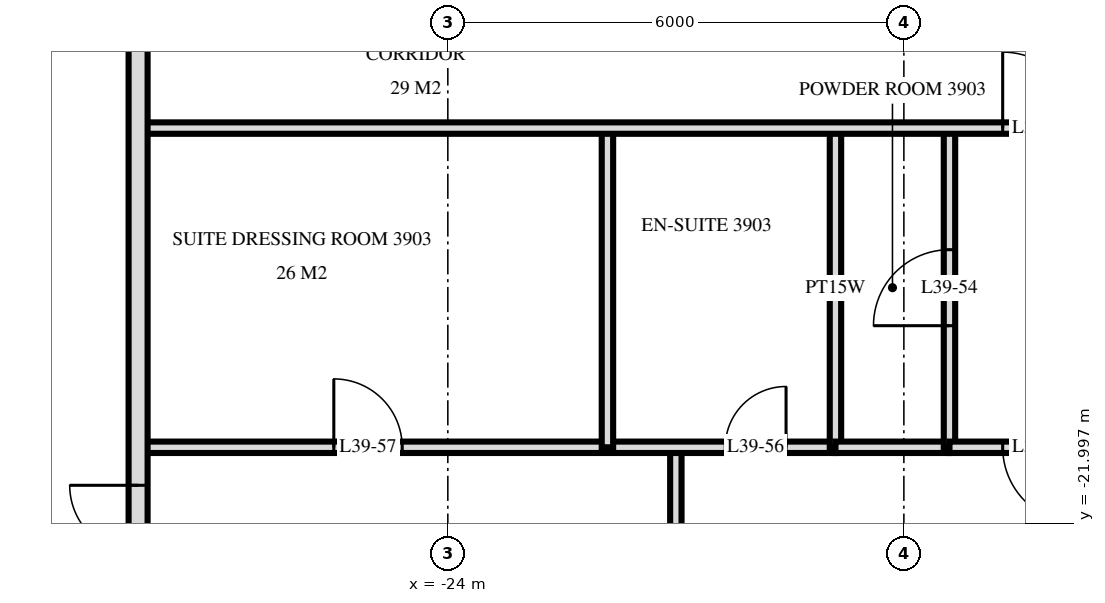
"""IFC4 building model, lengths in metres.
Left out: names, types, materials, properties, quantities, classifications, styles, units other than length and angle.
Written with IfcOpenShell. Run it as: python <this file> out.ifc"""

import sys

from ifc_helpers import new_model, si_unit, direction, frame, frame_2d, origin, place, context, subcontext, project, spatial, rectangle, extrude, element, fill, save


model = new_model("IFC4")
c1 = context("Model", 3, precision=1e-05, world=origin(), true_north=direction((0.0, 1.0)))
c2 = subcontext(c1, "Body", "Model", "MODEL_VIEW")
j1 = project(units=[si_unit("LENGTHUNIT", "METRE"), si_unit("PLANEANGLEUNIT", "RADIAN")], contexts=[c1])
p1 = place(None, origin())
s1 = spatial("IfcSite", under=j1, at=p1, CompositionType="ELEMENT")
p2 = place(p1, origin())
s2 = spatial("IfcBuilding", under=s1, at=p2, CompositionType="ELEMENT")
p3 = place(p2, frame((0.0, 0.0, 152.4)))
s3 = spatial("IfcBuildingStorey", under=s2, at=p3, CompositionType="ELEMENT", Elevation=152.4)
p4 = place(p3, frame((-28.075, -3.325, 0.0), z_axis=(0.0, 0.0, 1.0), x_axis=(0.0, -1.0, 0.0)))
e1 = element("IfcWall", 1, at=p4, inside=s3, PredefinedType="SOLIDWALL", context=c2, shape_type="SweptSolid", body=[
    extrude(rectangle(XDim=25.951, YDim=0.25, at=frame_2d((12.975, 0.0))), origin(), (0.0, 0.0, 1.0), 3.32),
])
p5 = place(p4, frame((7.275, 0.0, 0.0)))
e2 = element("IfcOpeningElement", 2, at=p5, cuts=e1, PredefinedType="OPENING", context=c2, shape_type="SweptSolid", body=[
    extrude(rectangle(XDim=1.8, YDim=2.4, at=frame_2d((0.9, 1.2))), frame((0.0, 0.135, 0.0), z_axis=(0.0, -1.0, 0.0), x_axis=(1.0, 0.0, 0.0)), (0.0, 0.0, 1.0), 0.27),
])
p6 = place(p4, frame((18.175, 0.0, 0.0)))
e3 = element("IfcOpeningElement", 3, at=p6, cuts=e1, PredefinedType="OPENING", context=c2, shape_type="SweptSolid", body=[
    extrude(rectangle(XDim=1.8, YDim=2.4, at=frame_2d((0.9, 1.2))), frame((0.0, 0.135, 0.0), z_axis=(0.0, -1.0, 0.0), x_axis=(1.0, 0.0, 0.0)), (0.0, 0.0, 1.0), 0.27),
])
p7 = place(p4, frame((21.075, 0.0, 0.0)))
e4 = element("IfcOpeningElement", 4, at=p7, cuts=e1, PredefinedType="OPENING", context=c2, shape_type="SweptSolid", body=[
    extrude(rectangle(XDim=1.8, YDim=2.4, at=frame_2d((0.9, 1.2))), frame((0.0, 0.135, 0.0), z_axis=(0.0, -1.0, 0.0), x_axis=(1.0, 0.0, 0.0)), (0.0, 0.0, 1.0), 0.27),
])
p8 = place(p4, frame((23.825, 0.0, 0.3)))
e5 = element("IfcOpeningElement", 5, at=p8, cuts=e1, PredefinedType="OPENING", context=c2, shape_type="SweptSolid", body=[
    extrude(rectangle(XDim=1.8, YDim=2.1, at=frame_2d((0.9, 1.05))), frame((0.0, 0.135, 0.0), z_axis=(0.0, -1.0, 0.0), x_axis=(1.0, 0.0, 0.0)), (0.0, 0.0, 1.0), 0.27),
])
p9 = place(p3, frame((-17.4, -21.0, 0.0), z_axis=(0.0, 0.0, 1.0), x_axis=(0.0, 1.0, 0.0)))
e6 = element("IfcWall", 6, at=p9, inside=s3, PredefinedType="PARTITIONING", context=c2, shape_type="SweptSolid", body=[
    extrude(rectangle(XDim=4.2, YDim=0.15, at=frame_2d((2.1, 0.0))), origin(), (0.0, 0.0, 1.0), 3.32),
])
p10 = place(p9, frame((1.6, 0.0, 0.0)))
e7 = element("IfcOpeningElement", 7, at=p10, cuts=e6, PredefinedType="OPENING", context=c2, shape_type="SweptSolid", body=[
    extrude(rectangle(XDim=1.0, YDim=2.1, at=frame_2d((0.5, 1.05))), frame((0.0, 0.085, 0.0), z_axis=(0.0, -1.0, 0.0), x_axis=(1.0, 0.0, 0.0)), (0.0, 0.0, 1.0), 0.17),
])
p11 = place(p3, frame((-18.9, -21.0, 0.0), z_axis=(0.0, 0.0, 1.0), x_axis=(0.0, 1.0, 0.0)))
e8 = element("IfcWall", 8, at=p11, inside=s3, PredefinedType="PLUMBINGWALL", context=c2, shape_type="SweptSolid", body=[
    extrude(rectangle(XDim=4.2, YDim=0.15, at=frame_2d((2.1, 0.0))), origin(), (0.0, 0.0, 1.0), 3.32),
])
p12 = place(p3, frame((-21.0, -33.62, 0.0), z_axis=(0.0, 0.0, 1.0), x_axis=(0.0, 1.0, 0.0)))
e9 = element("IfcWall", 9, at=p12, inside=s3, PredefinedType="PARTITIONING", context=c2, shape_type="SweptSolid", body=[
    extrude(rectangle(XDim=12.62, YDim=0.15, at=frame_2d((6.31, 0.0))), origin(), (0.0, 0.0, 1.0), 3.32),
])
p13 = place(p12, frame((5.77, 0.0, 0.0)))
e10 = element("IfcOpeningElement", 10, at=p13, cuts=e9, PredefinedType="OPENING", context=c2, shape_type="SweptSolid", body=[
    extrude(rectangle(XDim=0.9, YDim=2.1, at=frame_2d((0.45, 1.05))), frame((0.0, 0.085, 0.0), z_axis=(0.0, -1.0, 0.0), x_axis=(1.0, 0.0, 0.0)), (0.0, 0.0, 1.0), 0.17),
])
p14 = place(p3, frame((-21.9, -21.0, 0.0), z_axis=(0.0, 0.0, 1.0), x_axis=(0.0, 1.0, 0.0)))
e11 = element("IfcWall", 11, at=p14, inside=s3, PredefinedType="PARTITIONING", context=c2, shape_type="SweptSolid", body=[
    extrude(rectangle(XDim=4.2, YDim=0.15, at=frame_2d((2.1, 0.0))), origin(), (0.0, 0.0, 1.0), 3.32),
])
p15 = place(p3, frame((-17.4, -21.0, 0.0), z_axis=(0.0, 0.0, 1.0), x_axis=(1.0, 0.0, 0.0)))
e12 = element("IfcWall", 12, at=p15, inside=s3, PredefinedType="PARTITIONING", context=c2, shape_type="SweptSolid", body=[
    extrude(rectangle(XDim=2.4, YDim=0.15, at=frame_2d((1.2, 0.0))), origin(), (0.0, 0.0, 1.0), 3.32),
])
p16 = place(p15, frame((0.7, 0.0, 0.0)))
e13 = element("IfcOpeningElement", 13, at=p16, cuts=e12, PredefinedType="OPENING", context=c2, shape_type="SweptSolid", body=[
    extrude(rectangle(XDim=1.0, YDim=2.1, at=frame_2d((0.5, 1.05))), frame((0.0, 0.085, 0.0), z_axis=(0.0, -1.0, 0.0), x_axis=(1.0, 0.0, 0.0)), (0.0, 0.0, 1.0), 0.17),
])
p17 = place(p3, frame((-28.02, -21.0, 0.0), z_axis=(0.0, 0.0, 1.0), x_axis=(1.0, 0.0, 0.0)))
e14 = element("IfcWall", 14, at=p17, inside=s3, PredefinedType="PARTITIONING", context=c2, shape_type="SweptSolid", body=[
    extrude(rectangle(XDim=9.12, YDim=0.15, at=frame_2d((4.56, 0.0))), origin(), (0.0, 0.0, 1.0), 3.32),
])
p18 = place(p17, frame((7.67, 0.0, 0.0)))
e15 = element("IfcOpeningElement", 15, at=p18, cuts=e14, PredefinedType="OPENING", context=c2, shape_type="SweptSolid", body=[
    extrude(rectangle(XDim=0.8, YDim=2.1, at=frame_2d((0.4, 1.05))), frame((0.0, 0.085, 0.0), z_axis=(0.0, -1.0, 0.0), x_axis=(1.0, 0.0, 0.0)), (0.0, 0.0, 1.0), 0.17),
])
p19 = place(p17, frame((2.52, 0.0, 0.0)))
e16 = element("IfcOpeningElement", 16, at=p19, cuts=e14, PredefinedType="OPENING", context=c2, shape_type="SweptSolid", body=[
    extrude(rectangle(XDim=0.9, YDim=2.1, at=frame_2d((0.45, 1.05))), frame((0.0, 0.085, 0.0), z_axis=(0.0, -1.0, 0.0), x_axis=(1.0, 0.0, 0.0)), (0.0, 0.0, 1.0), 0.17),
])
p20 = place(p3, frame((-18.9, -21.0, 0.0), z_axis=(0.0, 0.0, 1.0), x_axis=(1.0, 0.0, 0.0)))
e17 = element("IfcWall", 17, at=p20, inside=s3, PredefinedType="PLUMBINGWALL", context=c2, shape_type="SweptSolid", body=[
    extrude(rectangle(XDim=1.5, YDim=0.15, at=frame_2d((0.75, 0.0))), origin(), (0.0, 0.0, 1.0), 3.32),
])
p21 = place(p3, frame((-28.02, -16.8, 0.0), z_axis=(0.0, 0.0, 1.0), x_axis=(1.0, 0.0, 0.0)))
e18 = element("IfcWall", 18, at=p21, inside=s3, PredefinedType="PARTITIONING", context=c2, shape_type="SweptSolid", body=[
    extrude(rectangle(XDim=56.04, YDim=0.15, at=frame_2d((28.02, 0.0))), origin(), (0.0, 0.0, 1.0), 3.32),
])
p22 = place(p21, frame((13.17, 0.0, 0.0)))
e19 = element("IfcOpeningElement", 19, at=p22, cuts=e18, PredefinedType="OPENING", context=c2, shape_type="SweptSolid", body=[
    extrude(rectangle(XDim=1.0, YDim=2.1, at=frame_2d((0.5, 1.05))), frame((0.0, 0.085, 0.0), z_axis=(0.0, -1.0, 0.0), x_axis=(1.0, 0.0, 0.0)), (0.0, 0.0, 1.0), 0.17),
])
p23 = place(p21, frame((11.32, 0.0, 0.0)))
e20 = element("IfcOpeningElement", 20, at=p23, cuts=e18, PredefinedType="OPENING", context=c2, shape_type="SweptSolid", body=[
    extrude(rectangle(XDim=1.0, YDim=2.1, at=frame_2d((0.5, 1.05))), frame((0.0, 0.085, 0.0), z_axis=(0.0, -1.0, 0.0), x_axis=(1.0, 0.0, 0.0)), (0.0, 0.0, 1.0), 0.17),
])
p24 = place(p21, frame((41.87, 0.0, 0.0)))
e21 = element("IfcOpeningElement", 21, at=p24, cuts=e18, PredefinedType="OPENING", context=c2, shape_type="SweptSolid", body=[
    extrude(rectangle(XDim=1.0, YDim=2.1, at=frame_2d((0.5, 1.05))), frame((0.0, 0.085, 0.0), z_axis=(0.0, -1.0, 0.0), x_axis=(1.0, 0.0, 0.0)), (0.0, 0.0, 1.0), 0.17),
])
p25 = place(p21, frame((43.72, 0.0, 0.0)))
e22 = element("IfcOpeningElement", 22, at=p25, cuts=e18, PredefinedType="OPENING", context=c2, shape_type="SweptSolid", body=[
    extrude(rectangle(XDim=1.0, YDim=2.1, at=frame_2d((0.5, 1.05))), frame((0.0, 0.085, 0.0), z_axis=(0.0, -1.0, 0.0), x_axis=(1.0, 0.0, 0.0)), (0.0, 0.0, 1.0), 0.17),
])
p26 = place(p21, frame((19.52, 0.0, 0.0)))
e23 = element("IfcOpeningElement", 23, at=p26, cuts=e18, PredefinedType="OPENING", context=c2, shape_type="SweptSolid", body=[
    extrude(rectangle(XDim=1.0, YDim=2.1, at=frame_2d((0.5, 1.05))), frame((0.0, 0.085, 0.0), z_axis=(0.0, -1.0, 0.0), x_axis=(1.0, 0.0, 0.0)), (0.0, 0.0, 1.0), 0.17),
])
p27 = place(p21, frame((27.52, 0.0, 0.0)))
e24 = element("IfcOpeningElement", 24, at=p27, cuts=e18, PredefinedType="OPENING", context=c2, shape_type="SweptSolid", body=[
    extrude(rectangle(XDim=1.0, YDim=2.1, at=frame_2d((0.5, 1.05))), frame((0.0, 0.085, 0.0), z_axis=(0.0, -1.0, 0.0), x_axis=(1.0, 0.0, 0.0)), (0.0, 0.0, 1.0), 0.17),
])
p28 = place(p21, frame((35.52, 0.0, 0.0)))
e25 = element("IfcOpeningElement", 25, at=p28, cuts=e18, PredefinedType="OPENING", context=c2, shape_type="SweptSolid", body=[
    extrude(rectangle(XDim=1.0, YDim=2.1, at=frame_2d((0.5, 1.05))), frame((0.0, 0.085, 0.0), z_axis=(0.0, -1.0, 0.0), x_axis=(1.0, 0.0, 0.0)), (0.0, 0.0, 1.0), 0.17),
])
p29 = place(p6, frame((0.9, 0.0, 0.0), z_axis=(0.0, 0.0, 1.0), x_axis=(-1.0, 0.0, 0.0)))
e26 = element("IfcDoor", 26, at=p29, inside=s3, OperationType="DOUBLE_DOOR_SINGLE_SWING", PredefinedType="DOOR", context=c2, shape_type="SweptSolid", body=[
    extrude(rectangle(XDim=1.8, YDim=2.4, at=frame_2d((0.0, 1.2))), frame((0.0, -0.025, 0.0), z_axis=(0.0, 1.0, 0.0), x_axis=(-1.0, 0.0, 0.0)), (0.0, 0.0, 1.0), 0.05),
])
fill(e3, e26)
p30 = place(p23, origin())
e27 = element("IfcDoor", 27, at=p30, inside=s3, OperationType="SINGLE_SWING_RIGHT", PredefinedType="DOOR", context=c2, shape_type="SweptSolid", body=[
    extrude(rectangle(XDim=1.0, YDim=2.1, at=frame_2d((0.5, 1.05))), frame((0.0, 0.025, 0.0), z_axis=(0.0, -1.0, 0.0), x_axis=(1.0, 0.0, 0.0)), (0.0, 0.0, 1.0), 0.05),
])
fill(e20, e27)
p31 = place(p10, origin())
e28 = element("IfcDoor", 28, at=p31, inside=s3, OperationType="SINGLE_SWING_RIGHT", PredefinedType="DOOR", context=c2, shape_type="SweptSolid", body=[
    extrude(rectangle(XDim=1.0, YDim=2.1, at=frame_2d((0.5, 1.05))), frame((0.0, 0.025, 0.0), z_axis=(0.0, -1.0, 0.0), x_axis=(1.0, 0.0, 0.0)), (0.0, 0.0, 1.0), 0.05),
])
fill(e7, e28)
p32 = place(p16, frame((0.5, 0.0, 0.0), z_axis=(0.0, 0.0, 1.0), x_axis=(-1.0, 0.0, 0.0)))
e29 = element("IfcDoor", 29, at=p32, inside=s3, OperationType="SINGLE_SWING_RIGHT", PredefinedType="DOOR", context=c2, shape_type="SweptSolid", body=[
    extrude(rectangle(XDim=1.0, YDim=2.1, at=frame_2d((0.0, 1.05))), frame((0.0, -0.025, 0.0), z_axis=(0.0, 1.0, 0.0), x_axis=(-1.0, 0.0, 0.0)), (0.0, 0.0, 1.0), 0.05),
])
fill(e13, e29)
p33 = place(p18, origin())
e30 = element("IfcDoor", 30, at=p33, inside=s3, OperationType="SINGLE_SWING_LEFT", PredefinedType="DOOR", context=c2, shape_type="SweptSolid", body=[
    extrude(rectangle(XDim=0.8, YDim=2.1, at=frame_2d((0.4, 1.05))), frame((0.0, 0.025, 0.0), z_axis=(0.0, -1.0, 0.0), x_axis=(1.0, 0.0, 0.0)), (0.0, 0.0, 1.0), 0.05),
])
fill(e15, e30)
p34 = place(p19, origin())
e31 = element("IfcDoor", 31, at=p34, inside=s3, OperationType="SINGLE_SWING_RIGHT", PredefinedType="DOOR", context=c2, shape_type="SweptSolid", body=[
    extrude(rectangle(XDim=0.9, YDim=2.1, at=frame_2d((0.45, 1.05))), frame((0.0, 0.025, 0.0), z_axis=(0.0, -1.0, 0.0), x_axis=(1.0, 0.0, 0.0)), (0.0, 0.0, 1.0), 0.05),
])
fill(e16, e31)
save(model, sys.argv[1])
